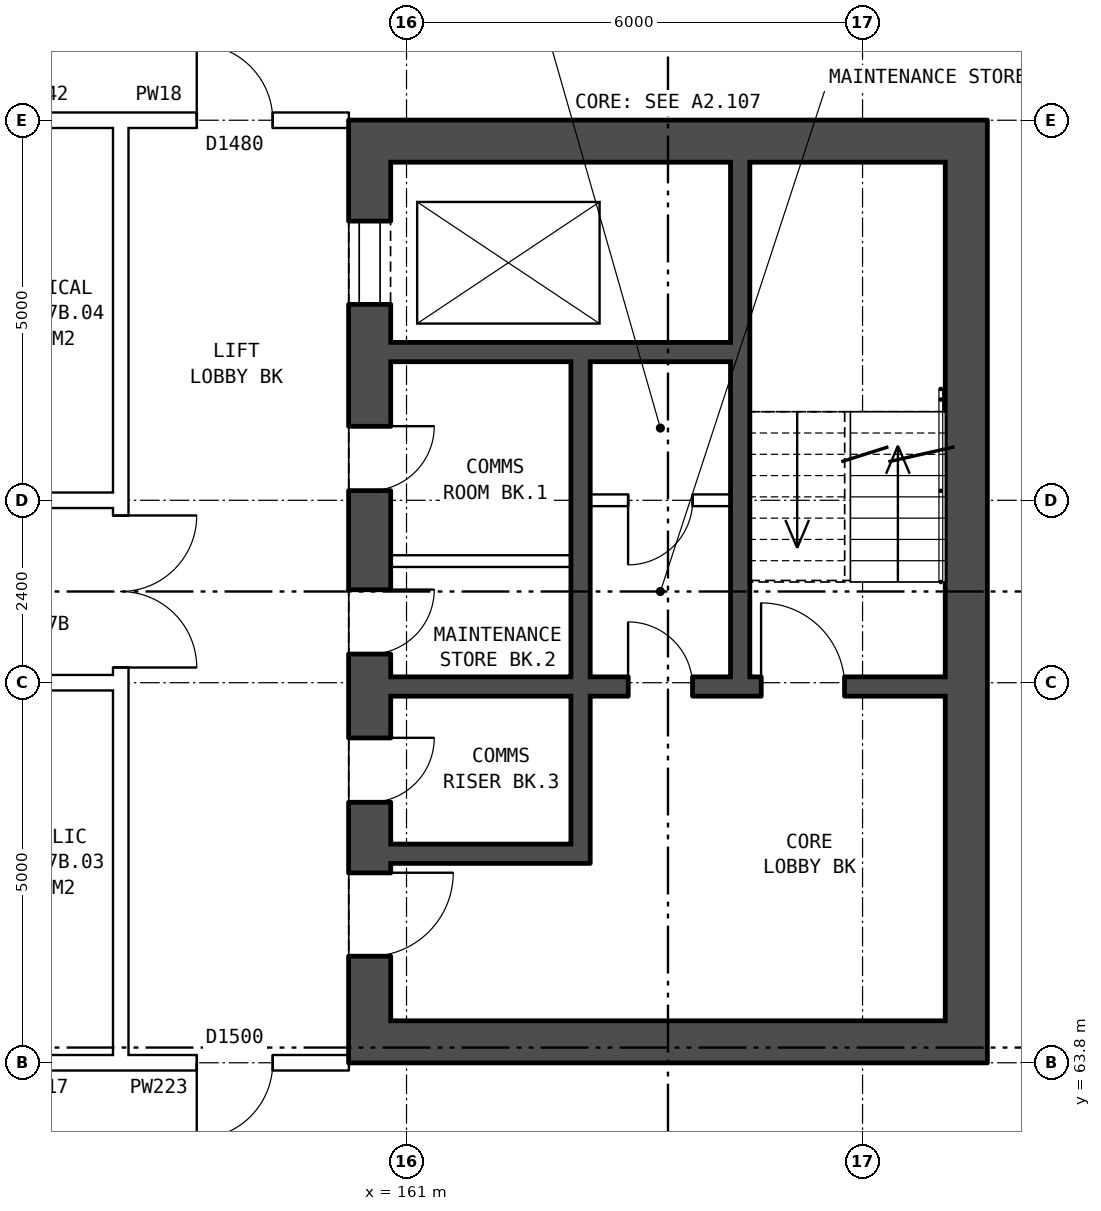
"""IFC4 building model, lengths in metres.
Left out: names, types, materials, properties, quantities, classifications, styles, units other than length and angle.
Written with IfcOpenShell. Run it as: python <this file> out.ifc"""

import sys

from ifc_helpers import new_model, si_unit, direction, frame, frame_2d, origin, place, context, subcontext, project, spatial, rectangle, extrude, element, fill, save


model = new_model("IFC4")
c1 = context("Model", 3, precision=1e-05, world=origin(), true_north=direction((0.0, 1.0)))
c2 = subcontext(c1, "Body", "Model", "MODEL_VIEW")
j1 = project(units=[si_unit("LENGTHUNIT", "METRE"), si_unit("PLANEANGLEUNIT", "RADIAN")], contexts=[c1])
p1 = place(None, origin())
s1 = spatial("IfcSite", under=j1, at=p1, CompositionType="ELEMENT")
p2 = place(p1, origin())
s2 = spatial("IfcBuilding", under=s1, at=p2, CompositionType="ELEMENT")
p3 = place(p2, frame((0.0, 0.0, 133.0)))
s3 = spatial("IfcBuildingStorey", under=s2, at=p3, CompositionType="ELEMENT", Elevation=133.0)
p4 = place(p3, frame((160.515, 76.2, 0.0), z_axis=(0.0, 0.0, 1.0), x_axis=(0.0, -1.0, 0.0)))
e1 = element("IfcWall", 1, at=p4, inside=s3, PredefinedType="SHEAR", context=c2, shape_type="SweptSolid", body=[
    extrude(rectangle(XDim=12.4, YDim=0.55, at=frame_2d((6.2, 0.0))), origin(), (0.0, 0.0, 1.0), 2.85),
])
p5 = place(p4, frame((1.325, 0.0, 0.0)))
e2 = element("IfcOpeningElement", 2, at=p5, cuts=e1, PredefinedType="OPENING", context=c2, shape_type="SweptSolid", body=[
    extrude(rectangle(XDim=1.1, YDim=2.1, at=frame_2d((0.55, 1.05))), frame((0.0, 0.285, 0.0), z_axis=(0.0, -1.0, 0.0), x_axis=(1.0, 0.0, 0.0)), (0.0, 0.0, 1.0), 0.57),
])
p6 = place(p4, frame((4.025, 0.0, 0.0)))
e3 = element("IfcOpeningElement", 3, at=p6, cuts=e1, PredefinedType="OPENING", context=c2, shape_type="SweptSolid", body=[
    extrude(rectangle(XDim=0.85, YDim=2.1, at=frame_2d((0.425, 1.05))), frame((0.0, 0.285, 0.0), z_axis=(0.0, -1.0, 0.0), x_axis=(1.0, 0.0, 0.0)), (0.0, 0.0, 1.0), 0.57),
])
p7 = place(p4, frame((6.175, 0.0, 0.0)))
e4 = element("IfcOpeningElement", 4, at=p7, cuts=e1, PredefinedType="OPENING", context=c2, shape_type="SweptSolid", body=[
    extrude(rectangle(XDim=0.85, YDim=2.1, at=frame_2d((0.425, 1.05))), frame((0.0, 0.285, 0.0), z_axis=(0.0, -1.0, 0.0), x_axis=(1.0, 0.0, 0.0)), (0.0, 0.0, 1.0), 0.57),
])
p8 = place(p4, frame((9.9, 0.0, 0.0)))
e5 = element("IfcOpeningElement", 5, at=p8, cuts=e1, PredefinedType="OPENING", context=c2, shape_type="SweptSolid", body=[
    extrude(rectangle(XDim=1.1, YDim=2.1, at=frame_2d((0.55, 1.05))), frame((0.0, 0.285, 0.0), z_axis=(0.0, -1.0, 0.0), x_axis=(1.0, 0.0, 0.0)), (0.0, 0.0, 1.0), 0.57),
])
p9 = place(p4, frame((8.125, 0.0, 0.0)))
e6 = element("IfcOpeningElement", 6, at=p9, cuts=e1, PredefinedType="OPENING", context=c2, shape_type="SweptSolid", body=[
    extrude(rectangle(XDim=0.85, YDim=2.1, at=frame_2d((0.425, 1.05))), frame((0.0, 0.285, 0.0), z_axis=(0.0, -1.0, 0.0), x_axis=(1.0, 0.0, 0.0)), (0.0, 0.0, 1.0), 0.57),
])
p10 = place(p3, frame((168.365, 76.2, 0.0), z_axis=(0.0, 0.0, 1.0), x_axis=(0.0, -1.0, 0.0)))
e7 = element("IfcWall", 7, at=p10, inside=s3, PredefinedType="SHEAR", context=c2, shape_type="SweptSolid", body=[
    extrude(rectangle(XDim=12.4, YDim=0.55, at=frame_2d((6.2, 0.0))), origin(), (0.0, 0.0, 1.0), 2.85),
])
for number, where, z_axis, x_axis in (
    (8, (160.79, 75.925, 0.0), (0.0, 0.0, 1.0), (1.0, 0.0, 0.0)),
    (9, (160.79, 64.075, 0.0), (0.0, 0.0, 1.0), (1.0, 0.0, 0.0)),
):
    element("IfcWall", number, at=place(p3, frame(where, z_axis=z_axis, x_axis=x_axis)), inside=s3, PredefinedType="SHEAR", context=c2, shape_type="SweptSolid", body=[
        extrude(rectangle(XDim=7.3, YDim=0.55, at=frame_2d((3.65, 0.0))), origin(), (0.0, 0.0, 1.0), 2.85),
    ])
p11 = place(p3, frame((160.79, 73.15, 0.0), z_axis=(0.0, 0.0, 1.0), x_axis=(1.0, 0.0, 0.0)))
e10 = element("IfcWall", 10, at=p11, inside=s3, PredefinedType="SHEAR", context=c2, shape_type="SweptSolid", body=[
    extrude(rectangle(XDim=4.475, YDim=0.25, at=frame_2d((2.237, 0.0))), origin(), (0.0, 0.0, 1.0), 2.85),
])
p12 = place(p3, frame((163.415, 71.2, 0.0), z_axis=(0.0, 0.0, 1.0), x_axis=(1.0, 0.0, 0.0)))
e11 = element("IfcWall", 11, at=p12, inside=s3, PredefinedType="PARTITIONING", context=c2, shape_type="SweptSolid", body=[
    extrude(rectangle(XDim=1.85, YDim=0.15, at=frame_2d((0.925, 0.0))), origin(), (0.0, 0.0, 1.0), 2.85),
])
p13 = place(p12, frame((0.5, 0.0, 0.0)))
e12 = element("IfcOpeningElement", 12, at=p13, cuts=e11, PredefinedType="OPENING", context=c2, shape_type="SweptSolid", body=[
    extrude(rectangle(XDim=0.85, YDim=2.1, at=frame_2d((0.425, 1.05))), frame((0.0, 0.085, 0.0), z_axis=(0.0, -1.0, 0.0), x_axis=(1.0, 0.0, 0.0)), (0.0, 0.0, 1.0), 0.17),
])
p14 = place(p3, frame((160.79, 70.4, 0.0), z_axis=(0.0, 0.0, 1.0), x_axis=(1.0, 0.0, 0.0)))
e13 = element("IfcWall", 13, at=p14, inside=s3, PredefinedType="PARTITIONING", context=c2, shape_type="SweptSolid", body=[
    extrude(rectangle(XDim=2.375, YDim=0.15, at=frame_2d((1.188, 0.0))), origin(), (0.0, 0.0, 1.0), 2.85),
])
p15 = place(p3, frame((160.79, 68.75, 0.0), z_axis=(0.0, 0.0, 1.0), x_axis=(1.0, 0.0, 0.0)))
e14 = element("IfcWall", 14, at=p15, inside=s3, PredefinedType="SHEAR", context=c2, shape_type="SweptSolid", body=[
    extrude(rectangle(XDim=7.3, YDim=0.25, at=frame_2d((3.65, 0.0))), origin(), (0.0, 0.0, 1.0), 2.85),
])
p16 = place(p15, frame((4.875, 0.0, 0.0)))
e15 = element("IfcOpeningElement", 15, at=p16, cuts=e14, PredefinedType="OPENING", context=c2, shape_type="SweptSolid", body=[
    extrude(rectangle(XDim=1.1, YDim=2.1, at=frame_2d((0.55, 1.05))), frame((0.0, 0.135, 0.0), z_axis=(0.0, -1.0, 0.0), x_axis=(1.0, 0.0, 0.0)), (0.0, 0.0, 1.0), 0.27),
])
p17 = place(p15, frame((3.125, 0.0, 0.0)))
e16 = element("IfcOpeningElement", 16, at=p17, cuts=e14, PredefinedType="OPENING", context=c2, shape_type="SweptSolid", body=[
    extrude(rectangle(XDim=0.85, YDim=2.1, at=frame_2d((0.425, 1.05))), frame((0.0, 0.135, 0.0), z_axis=(0.0, -1.0, 0.0), x_axis=(1.0, 0.0, 0.0)), (0.0, 0.0, 1.0), 0.27),
])
p18 = place(p3, frame((160.79, 66.55, 0.0), z_axis=(0.0, 0.0, 1.0), x_axis=(1.0, 0.0, 0.0)))
e17 = element("IfcWall", 17, at=p18, inside=s3, PredefinedType="SHEAR", context=c2, shape_type="SweptSolid", body=[
    extrude(rectangle(XDim=2.375, YDim=0.25, at=frame_2d((1.188, 0.0))), origin(), (0.0, 0.0, 1.0), 2.85),
])
p19 = place(p3, frame((163.29, 73.025, 0.0), z_axis=(0.0, 0.0, 1.0), x_axis=(0.0, -1.0, 0.0)))
e18 = element("IfcWall", 18, at=p19, inside=s3, PredefinedType="SHEAR", context=c2, shape_type="SweptSolid", body=[
    extrude(rectangle(XDim=4.15, YDim=0.25, at=frame_2d((2.075, 0.0))), origin(), (0.0, 0.0, 1.0), 2.85),
])
p20 = place(p3, frame((163.29, 68.625, 0.0), z_axis=(0.0, 0.0, 1.0), x_axis=(0.0, -1.0, 0.0)))
e19 = element("IfcWall", 19, at=p20, inside=s3, PredefinedType="SHEAR", context=c2, shape_type="SweptSolid", body=[
    extrude(rectangle(XDim=2.2, YDim=0.25, at=frame_2d((1.1, 0.0))), origin(), (0.0, 0.0, 1.0), 2.85),
])
p21 = place(p3, frame((165.39, 75.65, 0.0), z_axis=(0.0, 0.0, 1.0), x_axis=(0.0, -1.0, 0.0)))
e20 = element("IfcWall", 20, at=p21, inside=s3, PredefinedType="SHEAR", context=c2, shape_type="SweptSolid", body=[
    extrude(rectangle(XDim=6.775, YDim=0.25, at=frame_2d((3.387, 0.0))), origin(), (0.0, 0.0, 1.0), 2.85),
])
p22 = place(p3, frame((157.24, 63.9, 0.0), z_axis=(0.0, 0.0, 1.0), x_axis=(0.0, 1.0, 0.0)))
e21 = element("IfcWall", 21, at=p22, inside=s3, PredefinedType="PARTITIONING", context=c2, shape_type="SweptSolid", body=[
    extrude(rectangle(XDim=12.2, YDim=0.2, at=frame_2d((6.1, 0.0))), origin(), (0.0, 0.0, 1.0), 2.85),
])
p23 = place(p22, frame((5.1, 0.0, 0.0)))
e22 = element("IfcOpeningElement", 22, at=p23, cuts=e21, PredefinedType="OPENING", context=c2, shape_type="SweptSolid", body=[
    extrude(rectangle(XDim=2.0, YDim=2.1, at=frame_2d((1.0, 1.05))), frame((0.0, 0.11, 0.0), z_axis=(0.0, -1.0, 0.0), x_axis=(1.0, 0.0, 0.0)), (0.0, 0.0, 1.0), 0.22),
])
p24 = place(p3, frame((155.1, 63.8, 0.0), z_axis=(0.0, 0.0, 1.0), x_axis=(1.0, 0.0, 0.0)))
e23 = element("IfcWall", 23, at=p24, inside=s3, PredefinedType="PARTITIONING", context=c2, shape_type="SweptSolid", body=[
    extrude(rectangle(XDim=2.14, YDim=0.2, at=frame_2d((1.07, 0.0))), origin(), (0.0, 0.0, 1.0), 2.85),
])
p25 = place(p3, frame((157.24, 63.8, 0.0), z_axis=(0.0, 0.0, 1.0), x_axis=(1.0, 0.0, 0.0)))
e24 = element("IfcWall", 24, at=p25, inside=s3, PredefinedType="PARTITIONING", context=c2, shape_type="SweptSolid", body=[
    extrude(rectangle(XDim=3.0, YDim=0.2, at=frame_2d((1.5, 0.0))), origin(), (0.0, 0.0, 1.0), 2.85),
])
p26 = place(p25, frame((1.0, 0.0, 0.0)))
e25 = element("IfcOpeningElement", 25, at=p26, cuts=e24, PredefinedType="OPENING", context=c2, shape_type="SweptSolid", body=[
    extrude(rectangle(XDim=1.0, YDim=2.1, at=frame_2d((0.5, 1.05))), frame((0.0, 0.11, 0.0), z_axis=(0.0, -1.0, 0.0), x_axis=(1.0, 0.0, 0.0)), (0.0, 0.0, 1.0), 0.22),
])
p27 = place(p3, frame((142.76, 68.8, 0.0), z_axis=(0.0, 0.0, 1.0), x_axis=(1.0, 0.0, 0.0)))
e26 = element("IfcWall", 26, at=p27, inside=s3, PredefinedType="PARTITIONING", context=c2, shape_type="SweptSolid", body=[
    extrude(rectangle(XDim=14.48, YDim=0.2, at=frame_2d((7.24, 0.0))), origin(), (0.0, 0.0, 1.0), 2.85),
])
p28 = place(p27, frame((4.24, 0.0, 0.0)))
e27 = element("IfcOpeningElement", 27, at=p28, cuts=e26, PredefinedType="OPENING", context=c2, shape_type="SweptSolid", body=[
    extrude(rectangle(XDim=1.0, YDim=2.1, at=frame_2d((0.5, 1.05))), frame((0.0, 0.11, 0.0), z_axis=(0.0, -1.0, 0.0), x_axis=(1.0, 0.0, 0.0)), (0.0, 0.0, 1.0), 0.22),
])
p29 = place(p27, frame((10.24, 0.0, 0.0)))
e28 = element("IfcOpeningElement", 28, at=p29, cuts=e26, PredefinedType="OPENING", context=c2, shape_type="SweptSolid", body=[
    extrude(rectangle(XDim=1.0, YDim=2.1, at=frame_2d((0.5, 1.05))), frame((0.0, 0.11, 0.0), z_axis=(0.0, -1.0, 0.0), x_axis=(1.0, 0.0, 0.0)), (0.0, 0.0, 1.0), 0.22),
])
p30 = place(p3, frame((142.76, 71.2, 0.0), z_axis=(0.0, 0.0, 1.0), x_axis=(1.0, 0.0, 0.0)))
e29 = element("IfcWall", 29, at=p30, inside=s3, PredefinedType="PARTITIONING", context=c2, shape_type="SweptSolid", body=[
    extrude(rectangle(XDim=14.48, YDim=0.2, at=frame_2d((7.24, 0.0))), origin(), (0.0, 0.0, 1.0), 2.85),
])
p31 = place(p30, frame((1.12, 0.0, 0.0)))
e30 = element("IfcOpeningElement", 30, at=p31, cuts=e29, PredefinedType="OPENING", context=c2, shape_type="SweptSolid", body=[
    extrude(rectangle(XDim=1.0, YDim=2.1, at=frame_2d((0.5, 1.05))), frame((0.0, 0.11, 0.0), z_axis=(0.0, -1.0, 0.0), x_axis=(1.0, 0.0, 0.0)), (0.0, 0.0, 1.0), 0.22),
])
p32 = place(p30, frame((10.24, 0.0, 0.0)))
e31 = element("IfcOpeningElement", 31, at=p32, cuts=e29, PredefinedType="OPENING", context=c2, shape_type="SweptSolid", body=[
    extrude(rectangle(XDim=1.0, YDim=2.1, at=frame_2d((0.5, 1.05))), frame((0.0, 0.11, 0.0), z_axis=(0.0, -1.0, 0.0), x_axis=(1.0, 0.0, 0.0)), (0.0, 0.0, 1.0), 0.22),
])
p33 = place(p3, frame((155.1, 76.2, 0.0), z_axis=(0.0, 0.0, 1.0), x_axis=(1.0, 0.0, 0.0)))
e32 = element("IfcWall", 32, at=p33, inside=s3, PredefinedType="PARTITIONING", context=c2, shape_type="SweptSolid", body=[
    extrude(rectangle(XDim=2.14, YDim=0.2, at=frame_2d((1.07, 0.0))), origin(), (0.0, 0.0, 1.0), 2.85),
])
p34 = place(p3, frame((157.24, 76.2, 0.0), z_axis=(0.0, 0.0, 1.0), x_axis=(1.0, 0.0, 0.0)))
e33 = element("IfcWall", 33, at=p34, inside=s3, PredefinedType="PARTITIONING", context=c2, shape_type="SweptSolid", body=[
    extrude(rectangle(XDim=3.0, YDim=0.2, at=frame_2d((1.5, 0.0))), origin(), (0.0, 0.0, 1.0), 2.85),
])
p35 = place(p34, frame((1.0, 0.0, 0.0)))
e34 = element("IfcOpeningElement", 34, at=p35, cuts=e33, PredefinedType="OPENING", context=c2, shape_type="SweptSolid", body=[
    extrude(rectangle(XDim=1.0, YDim=2.1, at=frame_2d((0.5, 1.05))), frame((0.0, 0.11, 0.0), z_axis=(0.0, -1.0, 0.0), x_axis=(1.0, 0.0, 0.0)), (0.0, 0.0, 1.0), 0.22),
])
p36 = place(p5, origin())
e35 = element("IfcDoor", 35, at=p36, inside=s3, OperationType="DOUBLE_DOOR_SLIDING", PredefinedType="DOOR", context=c2, shape_type="SweptSolid", body=[
    extrude(rectangle(XDim=1.1, YDim=2.1, at=frame_2d((0.55, 1.05))), frame((0.0, 0.26, 0.0), z_axis=(0.0, -1.0, 0.0), x_axis=(1.0, 0.0, 0.0)), (0.0, 0.0, 1.0), 0.05),
])
fill(e2, e35)
p37 = place(p6, origin())
e36 = element("IfcDoor", 36, at=p37, inside=s3, OperationType="SINGLE_SWING_LEFT", PredefinedType="DOOR", context=c2, shape_type="SweptSolid", body=[
    extrude(rectangle(XDim=0.85, YDim=2.1, at=frame_2d((0.425, 1.05))), frame((0.0, 0.26, 0.0), z_axis=(0.0, -1.0, 0.0), x_axis=(1.0, 0.0, 0.0)), (0.0, 0.0, 1.0), 0.05),
])
fill(e3, e36)
p38 = place(p7, origin())
e37 = element("IfcDoor", 37, at=p38, inside=s3, OperationType="SINGLE_SWING_LEFT", PredefinedType="DOOR", context=c2, shape_type="SweptSolid", body=[
    extrude(rectangle(XDim=0.85, YDim=2.1, at=frame_2d((0.425, 1.05))), frame((0.0, 0.26, 0.0), z_axis=(0.0, -1.0, 0.0), x_axis=(1.0, 0.0, 0.0)), (0.0, 0.0, 1.0), 0.05),
])
fill(e4, e37)
p39 = place(p8, origin())
e38 = element("IfcDoor", 38, at=p39, inside=s3, OperationType="SINGLE_SWING_LEFT", PredefinedType="DOOR", context=c2, shape_type="SweptSolid", body=[
    extrude(rectangle(XDim=1.1, YDim=2.1, at=frame_2d((0.55, 1.05))), frame((0.0, 0.26, 0.0), z_axis=(0.0, -1.0, 0.0), x_axis=(1.0, 0.0, 0.0)), (0.0, 0.0, 1.0), 0.05),
])
fill(e5, e38)
p40 = place(p16, origin())
e39 = element("IfcDoor", 39, at=p40, inside=s3, OperationType="SINGLE_SWING_LEFT", PredefinedType="DOOR", context=c2, shape_type="SweptSolid", body=[
    extrude(rectangle(XDim=1.1, YDim=2.1, at=frame_2d((0.55, 1.05))), frame((0.0, 0.025, 0.0), z_axis=(0.0, -1.0, 0.0), x_axis=(1.0, 0.0, 0.0)), (0.0, 0.0, 1.0), 0.05),
])
fill(e15, e39)
p41 = place(p9, origin())
e40 = element("IfcDoor", 40, at=p41, inside=s3, OperationType="SINGLE_SWING_LEFT", PredefinedType="DOOR", context=c2, shape_type="SweptSolid", body=[
    extrude(rectangle(XDim=0.85, YDim=2.1, at=frame_2d((0.425, 1.05))), frame((0.0, 0.26, 0.0), z_axis=(0.0, -1.0, 0.0), x_axis=(1.0, 0.0, 0.0)), (0.0, 0.0, 1.0), 0.05),
])
fill(e6, e40)
p42 = place(p17, origin())
e41 = element("IfcDoor", 41, at=p42, inside=s3, OperationType="SINGLE_SWING_LEFT", PredefinedType="DOOR", context=c2, shape_type="SweptSolid", body=[
    extrude(rectangle(XDim=0.85, YDim=2.1, at=frame_2d((0.425, 1.05))), frame((0.0, 0.025, 0.0), z_axis=(0.0, -1.0, 0.0), x_axis=(1.0, 0.0, 0.0)), (0.0, 0.0, 1.0), 0.05),
])
fill(e16, e41)
p43 = place(p13, frame((0.85, 0.0, 0.0), z_axis=(0.0, 0.0, 1.0), x_axis=(-1.0, 0.0, 0.0)))
e42 = element("IfcDoor", 42, at=p43, inside=s3, OperationType="SINGLE_SWING_RIGHT", PredefinedType="DOOR", context=c2, shape_type="SweptSolid", body=[
    extrude(rectangle(XDim=0.85, YDim=2.1, at=frame_2d((0.425, 1.05))), frame((0.0, 0.025, 0.0), z_axis=(0.0, -1.0, 0.0), x_axis=(1.0, 0.0, 0.0)), (0.0, 0.0, 1.0), 0.05),
])
fill(e12, e42)
p44 = place(p23, frame((2.0, 0.0, 0.0), z_axis=(0.0, 0.0, 1.0), x_axis=(-1.0, 0.0, 0.0)))
e43 = element("IfcDoor", 43, at=p44, inside=s3, OperationType="DOUBLE_DOOR_SINGLE_SWING", PredefinedType="DOOR", context=c2, shape_type="SweptSolid", body=[
    extrude(rectangle(XDim=2.0, YDim=2.1, at=frame_2d((1.0, 1.05))), frame((0.0, 0.025, 0.0), z_axis=(0.0, -1.0, 0.0), x_axis=(1.0, 0.0, 0.0)), (0.0, 0.0, 1.0), 0.05),
])
fill(e22, e43)
p45 = place(p26, frame((1.0, 0.0, 0.0), z_axis=(0.0, 0.0, 1.0), x_axis=(-1.0, 0.0, 0.0)))
e44 = element("IfcDoor", 44, at=p45, inside=s3, OperationType="SINGLE_SWING_RIGHT", PredefinedType="DOOR", context=c2, shape_type="SweptSolid", body=[
    extrude(rectangle(XDim=1.0, YDim=2.1, at=frame_2d((0.5, 1.05))), frame((0.0, 0.025, 0.0), z_axis=(0.0, -1.0, 0.0), x_axis=(1.0, 0.0, 0.0)), (0.0, 0.0, 1.0), 0.05),
])
fill(e25, e44)
p46 = place(p35, origin())
e45 = element("IfcDoor", 45, at=p46, inside=s3, OperationType="SINGLE_SWING_LEFT", PredefinedType="DOOR", context=c2, shape_type="SweptSolid", body=[
    extrude(rectangle(XDim=1.0, YDim=2.1, at=frame_2d((0.5, 1.05))), frame((0.0, 0.025, 0.0), z_axis=(0.0, -1.0, 0.0), x_axis=(1.0, 0.0, 0.0)), (0.0, 0.0, 1.0), 0.05),
])
fill(e34, e45)
save(model, sys.argv[1])
